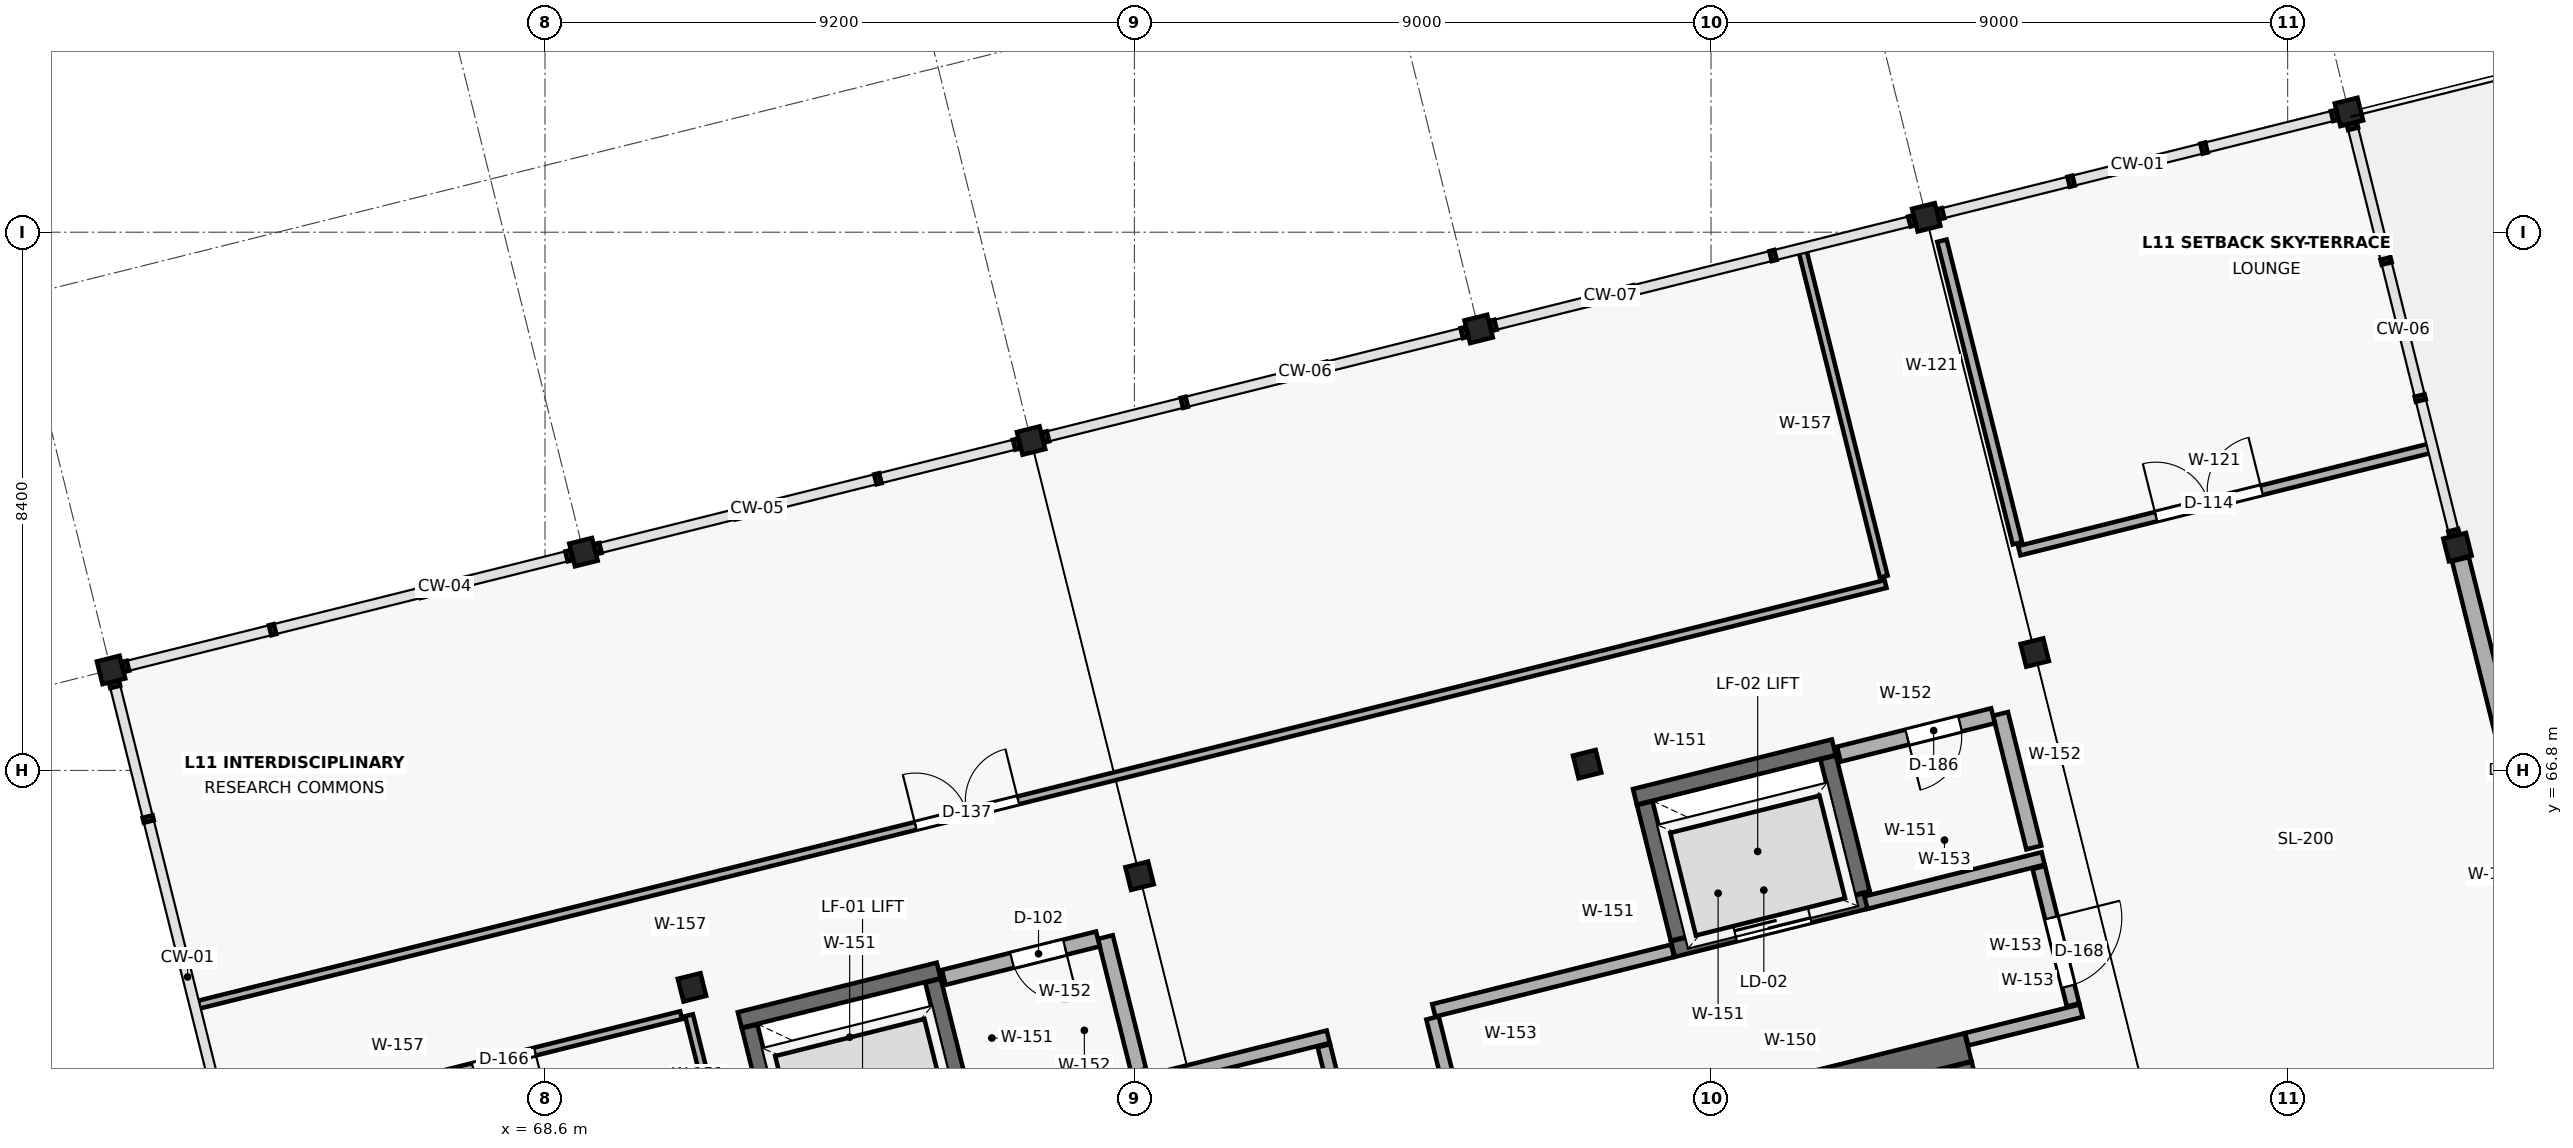
"""IFC4 building model, lengths in metres.
Left out: names, types, materials, properties, quantities, classifications, styles, units other than length and angle.
Written with IfcOpenShell. Run it as: python <this file> out.ifc"""

import sys

from ifc_helpers import new_model, si_unit, direction, frame, frame_2d, origin, origin_2d, place, context, subcontext, project, spatial, rectangle, extrude, element, fill, save


model = new_model("IFC4")
c1 = context("Model", 3, precision=1e-05, world=origin(), true_north=direction((0.0, 1.0)))
c2 = subcontext(c1, "Body", "Model", "MODEL_VIEW")
j1 = project(units=[si_unit("LENGTHUNIT", "METRE"), si_unit("PLANEANGLEUNIT", "RADIAN")], contexts=[c1])
p1 = place(None, origin())
s1 = spatial("IfcSite", under=j1, at=p1, CompositionType="ELEMENT")
p2 = place(p1, origin())
s2 = spatial("IfcBuilding", under=s1, at=p2, CompositionType="ELEMENT")
p3 = place(p2, frame((0.0, 0.0, 45.6)))
s3 = spatial("IfcBuildingStorey", under=s2, at=p3, CompositionType="ELEMENT", Elevation=45.6)
for number, where, z_axis, x_axis in (
    (1, (61.826, 68.368, 0.0), (0.0, 0.0, 1.0), (0.97, 0.242, 0.0)),
    (2, (70.894, 63.415, 0.0), (0.0, 0.0, 1.0), (0.97, 0.242, 0.0)),
    (3, (69.2, 70.207, 0.0), (0.0, 0.0, 1.0), (0.97, 0.242, 0.0)),
    (4, (77.88, 65.157, 0.0), (0.0, 0.0, 1.0), (0.97, 0.242, 0.0)),
    (5, (76.187, 71.949, 0.0), (0.0, 0.0, 1.0), (0.97, 0.242, 0.0)),
    (6, (84.866, 66.898, 0.0), (0.0, 0.0, 1.0), (0.97, 0.242, 0.0)),
    (7, (83.173, 73.691, 0.0), (0.0, 0.0, 1.0), (0.97, 0.242, 0.0)),
    (8, (91.852, 68.64, 0.0), (0.0, 0.0, 1.0), (0.97, 0.242, 0.0)),
    (9, (90.159, 75.432, 0.0), (0.0, 0.0, 1.0), (0.97, 0.242, 0.0)),
    (10, (98.45, 70.285, 0.0), (0.0, 0.0, 1.0), (0.97, 0.242, 0.0)),
    (11, (96.757, 77.077, 0.0), (0.0, 0.0, 1.0), (0.97, 0.242, 0.0)),
):
    element("IfcColumn", number, at=place(p3, frame(where, z_axis=z_axis, x_axis=x_axis)), inside=s3, PredefinedType="COLUMN", context=c2, shape_type="SweptSolid", body=[
        extrude(rectangle(XDim=0.365, YDim=0.365, at=origin_2d()), origin(), (0.0, 0.0, 1.0), 3.9),
    ])
p4 = place(p3, frame((98.497, 70.097, 0.0), z_axis=(0.0, 0.0, 1.0), x_axis=(0.241919880577, -0.970296228675, 0.0)))
e12 = element("IfcWall", 12, at=p4, inside=s3, PredefinedType="SOLIDWALL", context=c2, shape_type="SweptSolid", body=[
    extrude(rectangle(XDim=6.811, YDim=0.27, at=frame_2d((3.406, 0.0))), origin(), (0.0, 0.0, 1.0), 2.79),
])
p5 = place(p4, frame((2.605, 0.0, 0.0)))
e13 = element("IfcOpeningElement", 13, at=p5, cuts=e12, PredefinedType="OPENING", context=c2, shape_type="SweptSolid", body=[
    extrude(rectangle(XDim=1.6, YDim=2.25, at=frame_2d((0.8, 1.125))), frame((0.0, 0.147, 0.0), z_axis=(0.0, -1.0, 0.0), x_axis=(1.0, 0.0, 0.0)), (0.0, 0.0, 1.0), 0.294),
])
p6 = place(p3, frame((90.812, 62.48, 0.0), z_axis=(0.0, 0.0, 1.0), x_axis=(-0.970309259708, -0.2418676095, 0.0)))
e14 = element("IfcWall", 14, at=p6, inside=s3, PredefinedType="SHEAR", context=c2, shape_type="SweptSolid", body=[
    extrude(rectangle(XDim=4.3, YDim=0.45, at=frame_2d((2.15, 0.0))), origin(), (0.0, 0.0, 1.0), 3.72),
])
p7 = place(p3, frame((92.436, 55.037, 0.0), z_axis=(0.0, 0.0, 1.0), x_axis=(-0.241920660665, 0.970296034179, 0.0)))
e15 = element("IfcWall", 15, at=p7, inside=s3, PredefinedType="SHEAR", context=c2, shape_type="SweptSolid", body=[
    extrude(rectangle(XDim=7.38, YDim=0.45, at=frame_2d((3.69, 0.0))), origin(), (0.0, 0.0, 1.0), 3.72),
])
p8 = place(p3, frame((74.744, 63.679, 0.0), z_axis=(0.0, 0.0, 1.0), x_axis=(-0.970294894235, -0.241925232711, 0.0)))
e16 = element("IfcWall", 16, at=p8, inside=s3, PredefinedType="SHEAR", context=c2, shape_type="SweptSolid", body=[
    extrude(rectangle(XDim=3.2, YDim=0.25, at=frame_2d((1.6, 0.0))), origin(), (0.0, 0.0, 1.0), 3.72),
])
for number, where, z_axis, x_axis in (
    (17, (71.793, 62.804, 0.0), (0.0, 0.0, 1.0), (0.242, -0.97, 0.0)),
    (18, (75.183, 61.403, 0.0), (0.0, 0.0, 1.0), (-0.242, 0.97, 0.0)),
):
    element("IfcWall", number, at=place(p3, frame(where, z_axis=z_axis, x_axis=x_axis)), inside=s3, PredefinedType="SHEAR", context=c2, shape_type="SweptSolid", body=[
        extrude(rectangle(XDim=2.18, YDim=0.25, at=frame_2d((1.09, 0.0))), origin(), (0.0, 0.0, 1.0), 3.72),
    ])
p9 = place(p3, frame((88.717, 67.163, 0.0), z_axis=(0.0, 0.0, 1.0), x_axis=(-0.970294894235, -0.241925232711, 0.0)))
e19 = element("IfcWall", 19, at=p9, inside=s3, PredefinedType="SHEAR", context=c2, shape_type="SweptSolid", body=[
    extrude(rectangle(XDim=3.2, YDim=0.25, at=frame_2d((1.6, 0.0))), origin(), (0.0, 0.0, 1.0), 3.72),
])
for number, where, z_axis, x_axis in (
    (20, (85.766, 66.288, 0.0), (0.0, 0.0, 1.0), (0.242, -0.97, 0.0)),
    (21, (89.155, 64.886, 0.0), (0.0, 0.0, 1.0), (-0.242, 0.97, 0.0)),
):
    element("IfcWall", number, at=place(p3, frame(where, z_axis=z_axis, x_axis=x_axis)), inside=s3, PredefinedType="SHEAR", context=c2, shape_type="SweptSolid", body=[
        extrude(rectangle(XDim=2.18, YDim=0.25, at=frame_2d((1.09, 0.0))), origin(), (0.0, 0.0, 1.0), 3.72),
    ])
p10 = place(p3, frame((86.204, 64.011, 0.0), z_axis=(0.0, 0.0, 1.0), x_axis=(0.970294894235, 0.241925232711, 0.0)))
e22 = element("IfcWall", 22, at=p10, inside=s3, PredefinedType="SHEAR", context=c2, shape_type="SweptSolid", body=[
    extrude(rectangle(XDim=3.2, YDim=0.25, at=frame_2d((1.6, 0.0))), origin(), (0.0, 0.0, 1.0), 3.72),
])
p11 = place(p10, frame((1.0, 0.0, 0.0)))
e23 = element("IfcOpeningElement", 23, at=p11, cuts=e22, PredefinedType="OPENING", context=c2, shape_type="SweptSolid", body=[
    extrude(rectangle(XDim=1.2, YDim=2.2, at=frame_2d((0.6, 1.1))), frame((0.0, 0.137, 0.0), z_axis=(0.0, -1.0, 0.0), x_axis=(1.0, 0.0, 0.0)), (0.0, 0.0, 1.0), 0.274),
])
p12 = place(p3, frame((75.246, 61.253, 0.0), z_axis=(0.0, 0.0, 1.0), x_axis=(0.970292173201, 0.24193614576, 0.0)))
e24 = element("IfcWall", 24, at=p12, inside=s3, PredefinedType="STANDARD", context=c2, shape_type="SweptSolid", body=[
    extrude(rectangle(XDim=5.75, YDim=0.2, at=frame_2d((2.875, 0.0))), origin(), (0.0, 0.0, 1.0), 3.72),
])
p13 = place(p3, frame((80.757, 62.504, 0.0), z_axis=(0.0, 0.0, 1.0), x_axis=(0.241885902723, -0.970304699599, 0.0)))
e25 = element("IfcWall", 25, at=p13, inside=s3, PredefinedType="STANDARD", context=c2, shape_type="SweptSolid", body=[
    extrude(rectangle(XDim=3.36, YDim=0.2, at=frame_2d((1.68, 0.0))), origin(), (0.0, 0.0, 1.0), 3.72),
])
p14 = place(p13, frame((0.89, 0.0, 0.0)))
e26 = element("IfcOpeningElement", 26, at=p14, cuts=e25, PredefinedType="OPENING", context=c2, shape_type="SweptSolid", body=[
    extrude(rectangle(XDim=1.1, YDim=2.2, at=frame_2d((0.55, 1.1))), frame((0.0, 0.112, 0.0), z_axis=(0.0, -1.0, 0.0), x_axis=(1.0, 0.0, 0.0)), (0.0, 0.0, 1.0), 0.224),
])
p15 = place(p3, frame((82.453, 62.937, 0.0), z_axis=(0.0, 0.0, 1.0), x_axis=(0.241891967324, -0.970303187743, 0.0)))
e27 = element("IfcWall", 27, at=p15, inside=s3, PredefinedType="STANDARD", context=c2, shape_type="SweptSolid", body=[
    extrude(rectangle(XDim=5.98, YDim=0.2, at=frame_2d((2.99, 0.0))), origin(), (0.0, 0.0, 1.0), 3.72),
])
p16 = place(p3, frame((82.473, 63.055, 0.0), z_axis=(0.0, 0.0, 1.0), x_axis=(0.970284368558, 0.241967444366, 0.0)))
e28 = element("IfcWall", 28, at=p16, inside=s3, PredefinedType="STANDARD", context=c2, shape_type="SweptSolid", body=[
    extrude(rectangle(XDim=3.842, YDim=0.2, at=frame_2d((1.921, 0.0))), origin(), (0.0, 0.0, 1.0), 3.72),
])
p17 = place(p3, frame((90.791, 62.604, 0.0), z_axis=(0.0, 0.0, 1.0), x_axis=(0.970306180373, 0.241879962645, 0.0)))
e29 = element("IfcWall", 29, at=p17, inside=s3, PredefinedType="STANDARD", context=c2, shape_type="SweptSolid", body=[
    extrude(rectangle(XDim=1.84, YDim=0.2, at=frame_2d((0.92, 0.0))), origin(), (0.0, 0.0, 1.0), 3.72),
])
p18 = place(p3, frame((89.218, 64.737, 0.0), z_axis=(0.0, 0.0, 1.0), x_axis=(0.97027839681, 0.241991389687, 0.0)))
e30 = element("IfcWall", 30, at=p18, inside=s3, PredefinedType="STANDARD", context=c2, shape_type="SweptSolid", body=[
    extrude(rectangle(XDim=2.85, YDim=0.2, at=frame_2d((1.425, 0.0))), origin(), (0.0, 0.0, 1.0), 3.72),
])
p19 = place(p3, frame((91.916, 65.286, 0.0), z_axis=(0.0, 0.0, 1.0), x_axis=(0.241911789465, -0.970298245963, 0.0)))
e31 = element("IfcWall", 31, at=p19, inside=s3, PredefinedType="STANDARD", context=c2, shape_type="SweptSolid", body=[
    extrude(rectangle(XDim=2.21, YDim=0.2, at=frame_2d((1.105, 0.0))), origin(), (0.0, 0.0, 1.0), 3.72),
])
p20 = place(p19, frame((0.81, 0.0, 0.0)))
e32 = element("IfcOpeningElement", 32, at=p20, cuts=e31, PredefinedType="OPENING", context=c2, shape_type="SweptSolid", body=[
    extrude(rectangle(XDim=1.1, YDim=2.2, at=frame_2d((0.55, 1.1))), frame((0.0, 0.112, 0.0), z_axis=(0.0, -1.0, 0.0), x_axis=(1.0, 0.0, 0.0)), (0.0, 0.0, 1.0), 0.224),
])
p21 = place(p3, frame((77.866, 62.113, 0.0), z_axis=(0.0, 0.0, 1.0), x_axis=(-0.2418676095, 0.970309259708, 0.0)))
e33 = element("IfcWall", 33, at=p21, inside=s3, PredefinedType="STANDARD", context=c2, shape_type="SweptSolid", body=[
    extrude(rectangle(XDim=2.15, YDim=0.24, at=frame_2d((1.075, 0.0))), origin(), (0.0, 0.0, 1.0), 3.72),
])
p22 = place(p3, frame((77.229, 64.17, 0.0), z_axis=(0.0, 0.0, 1.0), x_axis=(-0.970310192441, -0.241863867589, 0.0)))
e34 = element("IfcWall", 34, at=p22, inside=s3, PredefinedType="STANDARD", context=c2, shape_type="SweptSolid", body=[
    extrude(rectangle(XDim=2.48, YDim=0.24, at=frame_2d((1.24, 0.0))), origin(), (0.0, 0.0, 1.0), 3.72),
])
p23 = place(p22, frame((0.53, 0.0, 0.0)))
e35 = element("IfcOpeningElement", 35, at=p23, cuts=e34, PredefinedType="OPENING", context=c2, shape_type="SweptSolid", body=[
    extrude(rectangle(XDim=0.85, YDim=2.1, at=frame_2d((0.425, 1.05))), frame((0.0, 0.132, 0.0), z_axis=(0.0, -1.0, 0.0), x_axis=(1.0, 0.0, 0.0)), (0.0, 0.0, 1.0), 0.264),
])
p24 = place(p3, frame((91.838, 65.596, 0.0), z_axis=(0.0, 0.0, 1.0), x_axis=(-0.2418676095, 0.970309259708, 0.0)))
e36 = element("IfcWall", 36, at=p24, inside=s3, PredefinedType="STANDARD", context=c2, shape_type="SweptSolid", body=[
    extrude(rectangle(XDim=2.15, YDim=0.24, at=frame_2d((1.075, 0.0))), origin(), (0.0, 0.0, 1.0), 3.72),
])
p25 = place(p3, frame((91.202, 67.654, 0.0), z_axis=(0.0, 0.0, 1.0), x_axis=(-0.970304433136, -0.241886971613, 0.0)))
e37 = element("IfcWall", 37, at=p25, inside=s3, PredefinedType="STANDARD", context=c2, shape_type="SweptSolid", body=[
    extrude(rectangle(XDim=2.48, YDim=0.24, at=frame_2d((1.24, 0.0))), origin(), (0.0, 0.0, 1.0), 3.72),
])
p26 = place(p25, frame((0.53, 0.0, 0.0)))
e38 = element("IfcOpeningElement", 38, at=p26, cuts=e37, PredefinedType="OPENING", context=c2, shape_type="SweptSolid", body=[
    extrude(rectangle(XDim=0.85, YDim=2.1, at=frame_2d((0.425, 1.05))), frame((0.0, 0.132, 0.0), z_axis=(0.0, -1.0, 0.0), x_axis=(1.0, 0.0, 0.0)), (0.0, 0.0, 1.0), 0.264),
])
p27 = place(p3, frame((72.39, 56.794, 0.0), z_axis=(0.0, 0.0, 1.0), x_axis=(-0.241922822951, 0.970295495061, 0.0)))
e39 = element("IfcWall", 39, at=p27, inside=s3, PredefinedType="PARTITIONING", context=c2, shape_type="SweptSolid", body=[
    extrude(rectangle(XDim=6.375, YDim=0.125, at=frame_2d((3.188, 0.0))), origin(), (0.0, 0.0, 1.0), 3.72),
])
p28 = place(p3, frame((70.724, 62.981, 0.0), z_axis=(0.0, 0.0, 1.0), x_axis=(-0.970293813542, -0.241929567029, 0.0)))
e40 = element("IfcWall", 40, at=p28, inside=s3, PredefinedType="PARTITIONING", context=c2, shape_type="SweptSolid", body=[
    extrude(rectangle(XDim=7.109, YDim=0.125, at=frame_2d((3.555, 0.0))), origin(), (0.0, 0.0, 1.0), 3.72),
])
p29 = place(p28, frame((2.35, 0.0, 0.0)))
e41 = element("IfcOpeningElement", 41, at=p29, cuts=e40, PredefinedType="OPENING", context=c2, shape_type="SweptSolid", body=[
    extrude(rectangle(XDim=1.0, YDim=2.25, at=frame_2d((0.5, 1.125))), frame((0.0, 0.074, 0.0), z_axis=(0.0, -1.0, 0.0), x_axis=(1.0, 0.0, 0.0)), (0.0, 0.0, 1.0), 0.149),
])
p30 = place(p3, frame((63.191, 63.143, 0.0), z_axis=(0.0, 0.0, 1.0), x_axis=(0.970296815205, 0.241917528103, 0.0)))
e42 = element("IfcWall", 42, at=p30, inside=s3, PredefinedType="PARTITIONING", context=c2, shape_type="SweptSolid", body=[
    extrude(rectangle(XDim=27.14, YDim=0.125, at=frame_2d((13.57, 0.0))), origin(), (0.0, 0.0, 1.0), 3.72),
])
p31 = place(p30, frame((11.537, 0.0, 0.0)))
e43 = element("IfcOpeningElement", 43, at=p31, cuts=e42, PredefinedType="OPENING", context=c2, shape_type="SweptSolid", body=[
    extrude(rectangle(XDim=1.65, YDim=2.35, at=frame_2d((0.825, 1.175))), frame((0.0, 0.074, 0.0), z_axis=(0.0, -1.0, 0.0), x_axis=(1.0, 0.0, 0.0)), (0.0, 0.0, 1.0), 0.149),
])
p32 = place(p3, frame((89.496, 69.825, 0.0), z_axis=(0.0, 0.0, 1.0), x_axis=(-0.241941325135, 0.970290881742, 0.0)))
e44 = element("IfcWall", 44, at=p32, inside=s3, PredefinedType="PARTITIONING", context=c2, shape_type="SweptSolid", body=[
    extrude(rectangle(XDim=5.22, YDim=0.125, at=frame_2d((2.61, 0.0))), origin(), (0.0, 0.0, 1.0), 3.72),
])
p33 = place(p3, frame((91.611, 70.229, 0.0), z_axis=(0.0, 0.0, 1.0), x_axis=(0.970294860044, 0.241925369839, 0.0)))
e45 = element("IfcWall", 45, at=p33, inside=s3, PredefinedType="PARTITIONING", context=c2, shape_type="SweptSolid", body=[
    extrude(rectangle(XDim=6.59, YDim=0.15, at=frame_2d((3.295, 0.0))), origin(), (0.0, 0.0, 1.0), 3.72),
])
p34 = place(p33, frame((2.2, 0.0, 0.0)))
e46 = element("IfcOpeningElement", 46, at=p34, cuts=e45, PredefinedType="OPENING", context=c2, shape_type="SweptSolid", body=[
    extrude(rectangle(XDim=1.7, YDim=2.4, at=frame_2d((0.85, 1.2))), frame((0.0, 0.087, 0.0), z_axis=(0.0, -1.0, 0.0), x_axis=(1.0, 0.0, 0.0)), (0.0, 0.0, 1.0), 0.174),
])
p35 = place(p3, frame((90.404, 75.067, 0.0), z_axis=(0.0, 0.0, 1.0), x_axis=(0.24195718177, -0.970286927764, 0.0)))
e47 = element("IfcWall", 47, at=p35, inside=s3, PredefinedType="PARTITIONING", context=c2, shape_type="SweptSolid", body=[
    extrude(rectangle(XDim=4.866, YDim=0.15, at=frame_2d((2.433, 0.0))), origin(), (0.0, 0.0, 1.0), 3.72),
])
p36 = place(p11, origin())
e48 = element("IfcDoor", 48, at=p36, inside=s3, OperationType="DOUBLE_DOOR_SLIDING", PredefinedType="DOOR", context=c2, shape_type="SweptSolid", body=[
    extrude(rectangle(XDim=1.2, YDim=2.2, at=frame_2d((0.6, 1.1))), frame((0.0, 0.025, 0.0), z_axis=(0.0, -1.0, 0.0), x_axis=(1.0, 0.0, 0.0)), (0.0, 0.0, 1.0), 0.05),
])
fill(e23, e48)
p37 = place(p20, origin())
e49 = element("IfcDoor", 49, at=p37, inside=s3, OperationType="SINGLE_SWING_LEFT", PredefinedType="DOOR", context=c2, shape_type="SweptSolid", body=[
    extrude(rectangle(XDim=1.1, YDim=2.2, at=frame_2d((0.55, 1.1))), frame((0.0, 0.025, 0.0), z_axis=(0.0, -1.0, 0.0), x_axis=(1.0, 0.0, 0.0)), (0.0, 0.0, 1.0), 0.05),
])
fill(e32, e49)
p38 = place(p23, origin())
e50 = element("IfcDoor", 50, at=p38, inside=s3, OperationType="SINGLE_SWING_LEFT", PredefinedType="DOOR", context=c2, shape_type="SweptSolid", body=[
    extrude(rectangle(XDim=0.85, YDim=2.1, at=frame_2d((0.425, 1.05))), frame((0.0, 0.025, 0.0), z_axis=(0.0, -1.0, 0.0), x_axis=(1.0, 0.0, 0.0)), (0.0, 0.0, 1.0), 0.05),
])
fill(e35, e50)
p39 = place(p26, origin())
e51 = element("IfcDoor", 51, at=p39, inside=s3, OperationType="SINGLE_SWING_RIGHT", PredefinedType="DOOR", context=c2, shape_type="SweptSolid", body=[
    extrude(rectangle(XDim=0.85, YDim=2.1, at=frame_2d((0.425, 1.05))), frame((0.0, 0.025, 0.0), z_axis=(0.0, -1.0, 0.0), x_axis=(1.0, 0.0, 0.0)), (0.0, 0.0, 1.0), 0.05),
])
fill(e38, e51)
p40 = place(p29, origin())
e52 = element("IfcDoor", 52, at=p40, inside=s3, OperationType="SINGLE_SWING_LEFT", PredefinedType="DOOR", context=c2, shape_type="SweptSolid", body=[
    extrude(rectangle(XDim=1.0, YDim=2.25, at=frame_2d((0.5, 1.125))), frame((0.0, 0.025, 0.0), z_axis=(0.0, -1.0, 0.0), x_axis=(1.0, 0.0, 0.0)), (0.0, 0.0, 1.0), 0.05),
])
fill(e41, e52)
p41 = place(p31, origin())
e53 = element("IfcDoor", 53, at=p41, inside=s3, OperationType="DOUBLE_DOOR_SINGLE_SWING", PredefinedType="DOOR", context=c2, shape_type="SweptSolid", body=[
    extrude(rectangle(XDim=1.65, YDim=2.35, at=frame_2d((0.825, 1.175))), frame((0.0, 0.025, 0.0), z_axis=(0.0, -1.0, 0.0), x_axis=(1.0, 0.0, 0.0)), (0.0, 0.0, 1.0), 0.05),
])
fill(e43, e53)
p42 = place(p34, origin())
e54 = element("IfcDoor", 54, at=p42, inside=s3, OperationType="DOUBLE_DOOR_SINGLE_SWING", PredefinedType="DOOR", context=c2, shape_type="SweptSolid", body=[
    extrude(rectangle(XDim=1.7, YDim=2.4, at=frame_2d((0.85, 1.2))), frame((0.0, 0.025, 0.0), z_axis=(0.0, -1.0, 0.0), x_axis=(1.0, 0.0, 0.0)), (0.0, 0.0, 1.0), 0.05),
])
fill(e46, e54)
save(model, sys.argv[1])
